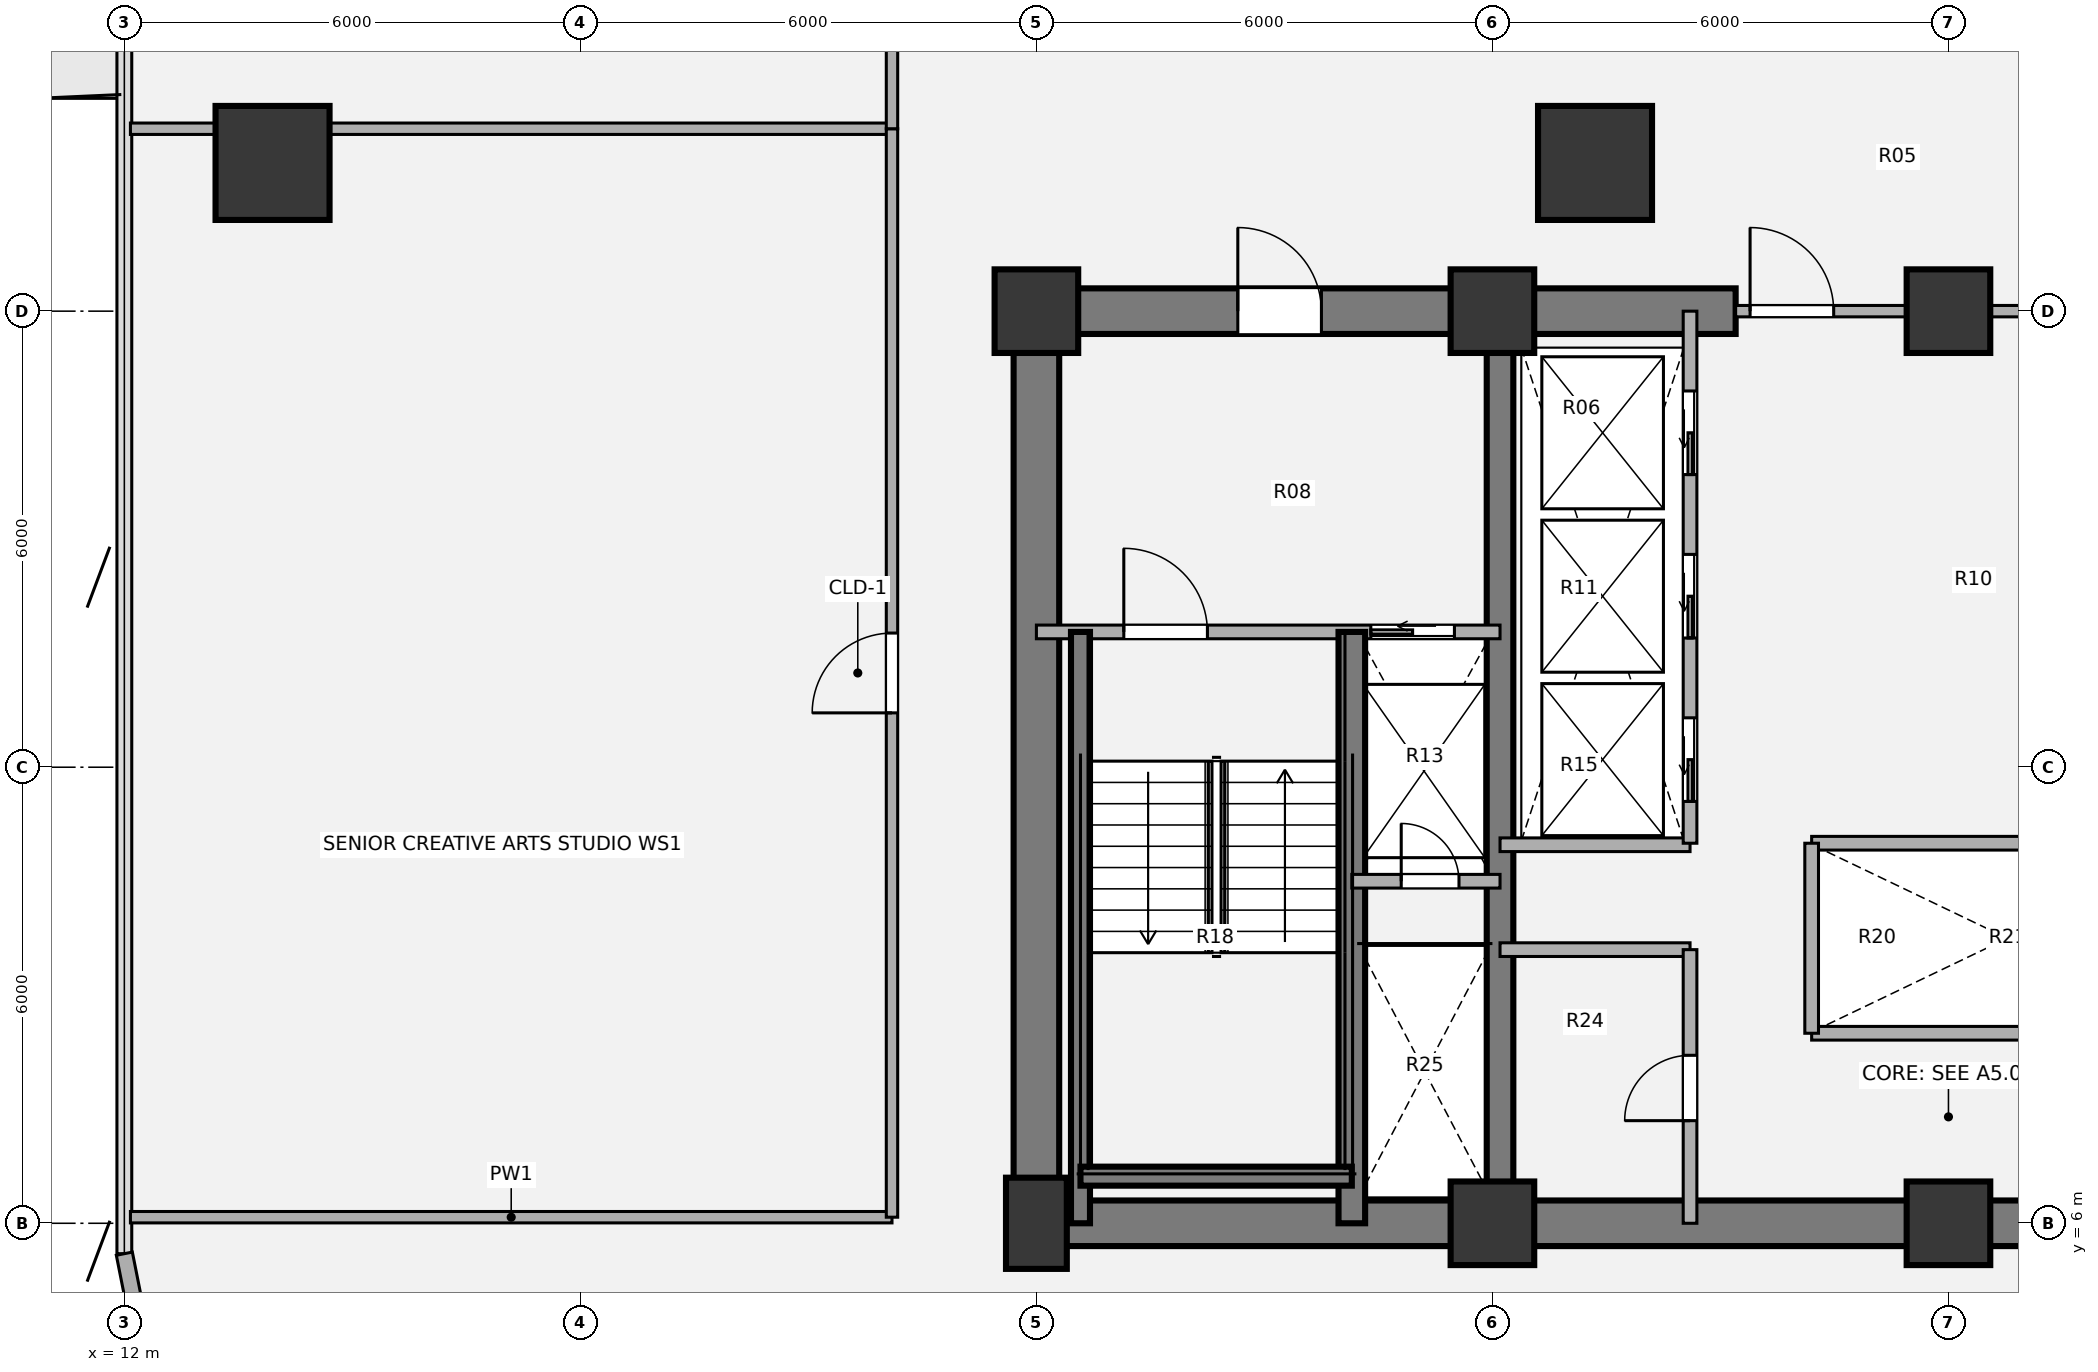
"""IFC4 building model, lengths in metres.
Left out: names, types, materials, properties, quantities, classifications, styles, units other than length and angle.
Written with IfcOpenShell. Run it as: python <this file> out.ifc"""

import sys

from ifc_helpers import new_model, si_unit, direction, frame, frame_2d, origin, origin_2d, place, context, subcontext, project, spatial, rectangle, hollow_circle, extrude, source, transform, mapped, element, fill, save


model = new_model("IFC4")
c1 = context("Model", 3, precision=1e-05, world=origin(), true_north=direction((0.0, 1.0)))
c2 = subcontext(c1, "Body", "Model", "MODEL_VIEW")
j1 = project(units=[si_unit("LENGTHUNIT", "METRE"), si_unit("PLANEANGLEUNIT", "RADIAN")], contexts=[c1])
p1 = place(None, origin())
s1 = spatial("IfcSite", under=j1, at=p1, CompositionType="ELEMENT")
p2 = place(p1, origin())
s2 = spatial("IfcBuilding", under=s1, at=p2, CompositionType="ELEMENT")
p3 = place(p2, frame((0.0, 0.0, 57.24)))
s3 = spatial("IfcBuildingStorey", under=s2, at=p3, CompositionType="ELEMENT", Elevation=57.24)
m1 = source(origin(), c2, "Body", "SweptSolid", [
    extrude(rectangle(XDim=0.8, YDim=1.2, at=origin_2d()), origin(), (0.0, 0.0, 1.0), 3.78),
])
p4 = place(p3, frame((24.0, 6.0, 0.0), z_axis=(0.0, 0.0, 1.0), x_axis=(1.0, 0.0, 0.0)))
e1 = element("IfcColumn", 1, at=p4, inside=s3, PredefinedType="COLUMN", context=c2, shape_type="MappedRepresentation", body=[
    mapped(m1, transform((0.0, 0.0, 0.0), x_axis=(1.0, 0.0, 0.0), y_axis=(0.0, 1.0, 0.0), z_axis=(0.0, 0.0, 1.0), scale=1.0)),
])
m2 = source(origin(), c2, "Body", "SweptSolid", [
    extrude(rectangle(XDim=1.1, YDim=1.1, at=origin_2d()), origin(), (0.0, 0.0, 1.0), 3.78),
])
for number, where, z_axis, x_axis in (
    (2, (30.0, 6.0, 0.0), (0.0, 0.0, 1.0), (1.0, 0.0, 0.0)),
    (3, (36.0, 6.0, 0.0), (0.0, 0.0, 1.0), (1.0, 0.0, 0.0)),
    (4, (24.0, 18.0, 0.0), (0.0, 0.0, 1.0), (1.0, 0.0, 0.0)),
    (5, (30.0, 18.0, 0.0), (0.0, 0.0, 1.0), (1.0, 0.0, 0.0)),
    (6, (36.0, 18.0, 0.0), (0.0, 0.0, 1.0), (1.0, 0.0, 0.0)),
):
    element("IfcColumn", number, at=place(p3, frame(where, z_axis=z_axis, x_axis=x_axis)), inside=s3, PredefinedType="COLUMN", context=c2, shape_type="MappedRepresentation", body=[
        mapped(m2, transform((0.0, 0.0, 0.0), x_axis=(1.0, 0.0, 0.0), y_axis=(0.0, 1.0, 0.0), z_axis=(0.0, 0.0, 1.0), scale=1.0)),
    ])
p5 = place(p3, frame((48.3, 6.0, 0.0), z_axis=(0.0, 0.0, 1.0), x_axis=(-1.0, 0.0, 0.0)))
e7 = element("IfcWall", 7, at=p5, inside=s3, PredefinedType="SHEAR", context=c2, shape_type="SweptSolid", body=[
    extrude(rectangle(XDim=24.6, YDim=0.6, at=frame_2d((12.3, 0.0))), origin(), (0.0, 0.0, 1.0), 3.78),
])
p6 = place(p3, frame((24.0, 6.0, 0.0), z_axis=(0.0, 0.0, 1.0), x_axis=(0.0, 1.0, 0.0)))
e8 = element("IfcWall", 8, at=p6, inside=s3, PredefinedType="SHEAR", context=c2, shape_type="SweptSolid", body=[
    extrude(rectangle(XDim=12.0, YDim=0.6, at=frame_2d((6.0, 0.0))), origin(), (0.0, 0.0, 1.0), 3.78),
])
p7 = place(p3, frame((23.7, 18.0, 0.0), z_axis=(0.0, 0.0, 1.0), x_axis=(1.0, 0.0, 0.0)))
e9 = element("IfcWall", 9, at=p7, inside=s3, PredefinedType="SHEAR", context=c2, shape_type="SweptSolid", body=[
    extrude(rectangle(XDim=9.5, YDim=0.6, at=frame_2d((4.75, 0.0))), origin(), (0.0, 0.0, 1.0), 3.78),
])
p8 = place(p7, frame((2.95, 0.0, 0.0)))
e10 = element("IfcOpeningElement", 10, at=p8, cuts=e9, PredefinedType="OPENING", context=c2, shape_type="SweptSolid", body=[
    extrude(rectangle(XDim=1.1, YDim=2.1, at=origin_2d()), frame((0.55, 0.31, 1.05), z_axis=(0.0, -1.0, 0.0), x_axis=(1.0, 0.0, 0.0)), (0.0, 0.0, 1.0), 0.62),
])
p9 = place(p3, frame((30.1, 6.0, 0.0), z_axis=(0.0, 0.0, 1.0), x_axis=(0.0, 1.0, 0.0)))
e11 = element("IfcWall", 11, at=p9, inside=s3, PredefinedType="SHEAR", context=c2, shape_type="SweptSolid", body=[
    extrude(rectangle(XDim=12.0, YDim=0.35, at=frame_2d((6.0, 0.0))), origin(), (0.0, 0.0, 1.0), 3.78),
])
m3 = source(origin(), c2, "Body", "SweptSolid", [
    extrude(hollow_circle(Radius=0.75, WallThickness=0.05, at=origin_2d()), origin(), (0.0, 0.0, 1.0), 3.78),
])
for number, where, z_axis, x_axis in (
    (12, (13.95, 19.95, 0.0), (0.0, 0.0, 1.0), (1.0, 0.0, 0.0)),
    (13, (31.35, 19.95, 0.0), (0.0, 0.0, 1.0), (1.0, 0.0, 0.0)),
):
    element("IfcColumn", number, at=place(p3, frame(where, z_axis=z_axis, x_axis=x_axis)), inside=s3, PredefinedType="COLUMN", context=c2, shape_type="MappedRepresentation", body=[
        mapped(m3, transform((0.0, 0.0, 0.0), x_axis=(1.0, 0.0, 0.0), y_axis=(0.0, 1.0, 0.0), z_axis=(0.0, 0.0, 1.0), scale=1.0)),
    ])
p10 = place(p3, frame((12.244, 4.375, 0.0), z_axis=(0.0, 0.0, 1.0), x_axis=(-0.195138390419, 0.980775717779, 0.0)))
e14 = element("IfcWall", 14, at=p10, inside=s3, PredefinedType="SOLIDWALL", context=c2, shape_type="SweptSolid", body=[
    extrude(rectangle(XDim=1.249, YDim=0.215, at=frame_2d((0.624, 0.0))), origin(), (0.0, 0.0, 1.0), 3.53),
])
for number, where, z_axis, x_axis in (
    (15, (34.2, 11.0, 0.0), (0.0, 0.0, 1.0), (1.0, 0.0, 0.0)),
    (16, (34.2, 8.5, 0.0), (0.0, 0.0, 1.0), (1.0, 0.0, 0.0)),
):
    element("IfcWall", number, at=place(p3, frame(where, z_axis=z_axis, x_axis=x_axis)), inside=s3, PredefinedType="PARTITIONING", context=c2, shape_type="SweptSolid", body=[
        extrude(rectangle(XDim=5.15, YDim=0.18, at=frame_2d((2.575, 0.0))), origin(), (0.0, 0.0, 1.0), 3.5),
    ])
for number, where, z_axis, x_axis in (
    (17, (34.2, 8.5, 0.0), (0.0, 0.0, 1.0), (0.0, 1.0, 0.0)),
    (18, (30.1, 10.98, 0.0), (0.0, 0.0, 1.0), (1.0, 0.0, 0.0)),
    (19, (30.1, 9.6, 0.0), (0.0, 0.0, 1.0), (1.0, 0.0, 0.0)),
):
    element("IfcWall", number, at=place(p3, frame(where, z_axis=z_axis, x_axis=x_axis)), inside=s3, PredefinedType="PARTITIONING", context=c2, shape_type="SweptSolid", body=[
        extrude(rectangle(XDim=2.5, YDim=0.18, at=frame_2d((1.25, 0.0))), origin(), (0.0, 0.0, 1.0), 3.5),
    ])
p11 = place(p3, frame((32.6, 6.0, 0.0), z_axis=(0.0, 0.0, 1.0), x_axis=(0.0, 1.0, 0.0)))
e20 = element("IfcWall", 20, at=p11, inside=s3, PredefinedType="PARTITIONING", context=c2, shape_type="SweptSolid", body=[
    extrude(rectangle(XDim=3.6, YDim=0.18, at=frame_2d((1.8, 0.0))), origin(), (0.0, 0.0, 1.0), 3.5),
])
p12 = place(p11, frame((1.35, 0.0, 0.0)))
e21 = element("IfcOpeningElement", 21, at=p12, cuts=e20, PredefinedType="OPENING", context=c2, shape_type="SweptSolid", body=[
    extrude(rectangle(XDim=0.86, YDim=2.1, at=origin_2d()), frame((0.43, 0.1, 1.05), z_axis=(0.0, -1.0, 0.0), x_axis=(1.0, 0.0, 0.0)), (0.0, 0.0, 1.0), 0.2),
])
p13 = place(p3, frame((33.2, 18.0, 0.0), z_axis=(0.0, 0.0, 1.0), x_axis=(1.0, 0.0, 0.0)))
e22 = element("IfcWall", 22, at=p13, inside=s3, PredefinedType="PARTITIONING", context=c2, shape_type="SweptSolid", body=[
    extrude(rectangle(XDim=5.6, YDim=0.15, at=frame_2d((2.8, 0.0))), origin(), (0.0, 0.0, 1.0), 2.315),
])
p14 = place(p13, frame((0.19, 0.0, 0.0)))
e23 = element("IfcOpeningElement", 23, at=p14, cuts=e22, PredefinedType="OPENING", context=c2, shape_type="SweptSolid", body=[
    extrude(rectangle(XDim=1.1, YDim=2.1, at=origin_2d()), frame((0.55, 0.085, 1.05), z_axis=(0.0, -1.0, 0.0), x_axis=(1.0, 0.0, 0.0)), (0.0, 0.0, 1.0), 0.17),
])
p15 = place(p13, frame((4.31, 0.0, 0.0)))
e24 = element("IfcOpeningElement", 24, at=p15, cuts=e22, PredefinedType="OPENING", context=c2, shape_type="SweptSolid", body=[
    extrude(rectangle(XDim=1.1, YDim=2.1, at=origin_2d()), frame((0.55, 0.085, 1.05), z_axis=(0.0, -1.0, 0.0), x_axis=(1.0, 0.0, 0.0)), (0.0, 0.0, 1.0), 0.17),
])
p16 = place(p3, frame((24.0, 13.78, 0.0), z_axis=(0.0, 0.0, 1.0), x_axis=(1.0, 0.0, 0.0)))
e25 = element("IfcWall", 25, at=p16, inside=s3, PredefinedType="PARTITIONING", context=c2, shape_type="SweptSolid", body=[
    extrude(rectangle(XDim=6.1, YDim=0.18, at=frame_2d((3.05, 0.0))), origin(), (0.0, 0.0, 1.0), 3.5),
])
p17 = place(p16, frame((1.15, 0.0, 0.0)))
e26 = element("IfcOpeningElement", 26, at=p17, cuts=e25, PredefinedType="OPENING", context=c2, shape_type="SweptSolid", body=[
    extrude(rectangle(XDim=1.1, YDim=2.1, at=origin_2d()), frame((0.55, 0.1, 1.05), z_axis=(0.0, -1.0, 0.0), x_axis=(1.0, 0.0, 0.0)), (0.0, 0.0, 1.0), 0.2),
])
p18 = place(p16, frame((4.4, 0.0, 0.0)))
e27 = element("IfcOpeningElement", 27, at=p18, cuts=e25, PredefinedType="OPENING", context=c2, shape_type="SweptSolid", body=[
    extrude(rectangle(XDim=1.1, YDim=2.1, at=origin_2d()), frame((0.55, 0.1, 1.05), z_axis=(0.0, -1.0, 0.0), x_axis=(1.0, 0.0, 0.0)), (0.0, 0.0, 1.0), 0.2),
])
p19 = place(p3, frame((28.15, 6.0, 0.0), z_axis=(0.0, 0.0, 1.0), x_axis=(0.0, 1.0, 0.0)))
e28 = element("IfcWall", 28, at=p19, inside=s3, PredefinedType="SHEAR", context=c2, shape_type="SweptSolid", body=[
    extrude(rectangle(XDim=7.78, YDim=0.35, at=frame_2d((3.89, 0.0))), origin(), (0.0, 0.0, 1.0), 3.85),
])
p20 = place(p3, frame((24.58, 6.0, 0.0), z_axis=(0.0, 0.0, 1.0), x_axis=(0.0, 1.0, 0.0)))
e29 = element("IfcWall", 29, at=p20, inside=s3, PredefinedType="SHEAR", context=c2, shape_type="SweptSolid", body=[
    extrude(rectangle(XDim=7.78, YDim=0.25, at=frame_2d((3.89, 0.0))), origin(), (0.0, 0.0, 1.0), 3.85),
])
p21 = place(p3, frame((24.58, 6.62, 0.0), z_axis=(0.0, 0.0, 1.0), x_axis=(1.0, 0.0, 0.0)))
e30 = element("IfcWall", 30, at=p21, inside=s3, PredefinedType="SHEAR", context=c2, shape_type="SweptSolid", body=[
    extrude(rectangle(XDim=3.57, YDim=0.25, at=frame_2d((1.785, 0.0))), origin(), (0.0, 0.0, 1.0), 3.85),
])
p22 = place(p3, frame((28.15, 10.5, 0.0), z_axis=(0.0, 0.0, 1.0), x_axis=(1.0, 0.0, 0.0)))
e31 = element("IfcWall", 31, at=p22, inside=s3, PredefinedType="PARTITIONING", context=c2, shape_type="SweptSolid", body=[
    extrude(rectangle(XDim=1.95, YDim=0.18, at=frame_2d((0.975, 0.0))), origin(), (0.0, 0.0, 1.0), 3.5),
])
p23 = place(p22, frame((0.65, 0.0, 0.0)))
e32 = element("IfcOpeningElement", 32, at=p23, cuts=e31, PredefinedType="OPENING", context=c2, shape_type="SweptSolid", body=[
    extrude(rectangle(XDim=0.76, YDim=2.05, at=origin_2d()), frame((0.38, 0.1, 1.025), z_axis=(0.0, -1.0, 0.0), x_axis=(1.0, 0.0, 0.0)), (0.0, 0.0, 1.0), 0.2),
])
p24 = place(p3, frame((32.6, 11.0, 0.0), z_axis=(0.0, 0.0, 1.0), x_axis=(0.0, 1.0, 0.0)))
e33 = element("IfcWall", 33, at=p24, inside=s3, PredefinedType="PARTITIONING", context=c2, shape_type="SweptSolid", body=[
    extrude(rectangle(XDim=7.0, YDim=0.18, at=frame_2d((3.5, 0.0))), origin(), (0.0, 0.0, 1.0), 3.5),
])
p25 = place(p24, frame((0.55, 0.0, 0.0)))
e34 = element("IfcOpeningElement", 34, at=p25, cuts=e33, PredefinedType="OPENING", context=c2, shape_type="SweptSolid", body=[
    extrude(rectangle(XDim=1.1, YDim=2.1, at=origin_2d()), frame((0.55, 0.1, 1.05), z_axis=(0.0, -1.0, 0.0), x_axis=(1.0, 0.0, 0.0)), (0.0, 0.0, 1.0), 0.2),
])
p26 = place(p24, frame((2.7, 0.0, 0.0)))
e35 = element("IfcOpeningElement", 35, at=p26, cuts=e33, PredefinedType="OPENING", context=c2, shape_type="SweptSolid", body=[
    extrude(rectangle(XDim=1.1, YDim=2.1, at=origin_2d()), frame((0.55, 0.1, 1.05), z_axis=(0.0, -1.0, 0.0), x_axis=(1.0, 0.0, 0.0)), (0.0, 0.0, 1.0), 0.2),
])
p27 = place(p24, frame((4.85, 0.0, 0.0)))
e36 = element("IfcOpeningElement", 36, at=p27, cuts=e33, PredefinedType="OPENING", context=c2, shape_type="SweptSolid", body=[
    extrude(rectangle(XDim=1.1, YDim=2.1, at=origin_2d()), frame((0.55, 0.1, 1.05), z_axis=(0.0, -1.0, 0.0), x_axis=(1.0, 0.0, 0.0)), (0.0, 0.0, 1.0), 0.2),
])
p28 = place(p3, frame((12.08, 6.08, 0.0), z_axis=(0.0, 0.0, 1.0), x_axis=(1.0, 0.0, 0.0)))
e37 = element("IfcWall", 37, at=p28, inside=s3, PredefinedType="PARTITIONING", context=c2, shape_type="SweptSolid", body=[
    extrude(rectangle(XDim=10.02, YDim=0.15, at=frame_2d((5.01, 0.0))), origin(), (0.0, 0.0, 1.0), 3.5),
])
p29 = place(p3, frame((12.08, 20.4, 0.0), z_axis=(0.0, 0.0, 1.0), x_axis=(1.0, 0.0, 0.0)))
e38 = element("IfcWall", 38, at=p29, inside=s3, PredefinedType="PARTITIONING", context=c2, shape_type="SweptSolid", body=[
    extrude(rectangle(XDim=10.02, YDim=0.15, at=frame_2d((5.01, 0.0))), origin(), (0.0, 0.0, 1.0), 2.982),
])
p30 = place(p3, frame((22.1, 6.08, 0.0), z_axis=(0.0, 0.0, 1.0), x_axis=(0.0, 1.0, 0.0)))
e39 = element("IfcWall", 39, at=p30, inside=s3, PredefinedType="PARTITIONING", context=c2, shape_type="SweptSolid", body=[
    extrude(rectangle(XDim=14.32, YDim=0.15, at=frame_2d((7.16, 0.0))), origin(), (0.0, 0.0, 1.0), 3.5),
])
p31 = place(p30, frame((6.635, 0.0, 0.0)))
e40 = element("IfcOpeningElement", 40, at=p31, cuts=e39, PredefinedType="OPENING", context=c2, shape_type="SweptSolid", body=[
    extrude(rectangle(XDim=1.05, YDim=2.1, at=origin_2d()), frame((0.525, 0.085, 1.05), z_axis=(0.0, -1.0, 0.0), x_axis=(1.0, 0.0, 0.0)), (0.0, 0.0, 1.0), 0.17),
])
p32 = place(p3, frame((22.1, 20.4, 0.0), z_axis=(0.0, 0.0, 1.0), x_axis=(0.0, 1.0, 0.0)))
e41 = element("IfcWall", 41, at=p32, inside=s3, PredefinedType="PARTITIONING", context=c2, shape_type="SweptSolid", body=[
    extrude(rectangle(XDim=15.521, YDim=0.15, at=frame_2d((7.76, 0.0))), origin(), (0.0, 0.0, 1.0), 3.5),
])
p33 = place(p32, frame((6.975, 0.0, 0.0)))
e42 = element("IfcOpeningElement", 42, at=p33, cuts=e41, PredefinedType="OPENING", context=c2, shape_type="SweptSolid", body=[
    extrude(rectangle(XDim=1.05, YDim=2.1, at=origin_2d()), frame((0.525, 0.085, 1.05), z_axis=(0.0, -1.0, 0.0), x_axis=(1.0, 0.0, 0.0)), (0.0, 0.0, 1.0), 0.17),
])
m4 = source(origin(), c2, "Body", "SweptSolid", [
    extrude(rectangle(XDim=0.86, YDim=2.1, at=origin_2d()), frame((0.43, 0.025, 1.05), z_axis=(0.0, -1.0, 0.0), x_axis=(1.0, 0.0, 0.0)), (0.0, 0.0, 1.0), 0.05),
])
p34 = place(p12, origin())
e43 = element("IfcDoor", 43, at=p34, inside=s3, OperationType="SINGLE_SWING_LEFT", PredefinedType="DOOR", context=c2, shape_type="MappedRepresentation", body=[
    mapped(m4, transform((0.0, 0.0, 0.0), x_axis=(1.0, 0.0, 0.0), y_axis=(0.0, 1.0, 0.0), z_axis=(0.0, 0.0, 1.0), scale=1.0)),
])
fill(e21, e43)
m5 = source(origin(), c2, "Body", "SweptSolid", [
    extrude(rectangle(XDim=1.1, YDim=2.1, at=origin_2d()), frame((0.55, 0.025, 1.05), z_axis=(0.0, -1.0, 0.0), x_axis=(1.0, 0.0, 0.0)), (0.0, 0.0, 1.0), 0.05),
])
p35 = place(p14, origin())
e44 = element("IfcDoor", 44, at=p35, inside=s3, OperationType="SINGLE_SWING_LEFT", PredefinedType="DOOR", context=c2, shape_type="MappedRepresentation", body=[
    mapped(m5, transform((0.0, 0.0, 0.0), x_axis=(1.0, 0.0, 0.0), y_axis=(0.0, 1.0, 0.0), z_axis=(0.0, 0.0, 1.0), scale=1.0)),
])
fill(e23, e44)
m6 = source(origin(), c2, "Body", "SweptSolid", [
    extrude(rectangle(XDim=1.1, YDim=2.1, at=origin_2d()), frame((0.55, 0.025, 1.05), z_axis=(0.0, -1.0, 0.0), x_axis=(1.0, 0.0, 0.0)), (0.0, 0.0, 1.0), 0.05),
])
p36 = place(p17, origin())
e45 = element("IfcDoor", 45, at=p36, inside=s3, OperationType="SINGLE_SWING_LEFT", PredefinedType="DOOR", context=c2, shape_type="MappedRepresentation", body=[
    mapped(m6, transform((0.0, 0.0, 0.0), x_axis=(1.0, 0.0, 0.0), y_axis=(0.0, 1.0, 0.0), z_axis=(0.0, 0.0, 1.0), scale=1.0)),
])
fill(e26, e45)
m7 = source(origin(), c2, "Body", "SweptSolid", [
    extrude(rectangle(XDim=1.1, YDim=2.1, at=origin_2d()), frame((0.55, 0.025, 1.05), z_axis=(0.0, -1.0, 0.0), x_axis=(1.0, 0.0, 0.0)), (0.0, 0.0, 1.0), 0.05),
])
p37 = place(p18, origin())
e46 = element("IfcDoor", 46, at=p37, inside=s3, OperationType="SLIDING_TO_LEFT", PredefinedType="DOOR", context=c2, shape_type="MappedRepresentation", body=[
    mapped(m7, transform((0.0, 0.0, 0.0), x_axis=(1.0, 0.0, 0.0), y_axis=(0.0, 1.0, 0.0), z_axis=(0.0, 0.0, 1.0), scale=1.0)),
])
fill(e27, e46)
m8 = source(origin(), c2, "Body", "SweptSolid", [
    extrude(rectangle(XDim=0.76, YDim=2.05, at=origin_2d()), frame((0.38, 0.025, 1.025), z_axis=(0.0, -1.0, 0.0), x_axis=(1.0, 0.0, 0.0)), (0.0, 0.0, 1.0), 0.05),
])
p38 = place(p23, origin())
e47 = element("IfcDoor", 47, at=p38, inside=s3, OperationType="SINGLE_SWING_LEFT", PredefinedType="DOOR", context=c2, shape_type="MappedRepresentation", body=[
    mapped(m8, transform((0.0, 0.0, 0.0), x_axis=(1.0, 0.0, 0.0), y_axis=(0.0, 1.0, 0.0), z_axis=(0.0, 0.0, 1.0), scale=1.0)),
])
fill(e32, e47)
p39 = place(p8, origin())
e48 = element("IfcDoor", 48, at=p39, inside=s3, OperationType="SINGLE_SWING_LEFT", PredefinedType="DOOR", context=c2, shape_type="MappedRepresentation", body=[
    mapped(m5, transform((0.0, 0.0, 0.0), x_axis=(1.0, 0.0, 0.0), y_axis=(0.0, 1.0, 0.0), z_axis=(0.0, 0.0, 1.0), scale=1.0)),
])
fill(e10, e48)
p40 = place(p25, origin())
e49 = element("IfcDoor", 49, at=p40, inside=s3, OperationType="SLIDING_TO_LEFT", PredefinedType="DOOR", context=c2, shape_type="MappedRepresentation", body=[
    mapped(m7, transform((0.0, 0.0, 0.0), x_axis=(1.0, 0.0, 0.0), y_axis=(0.0, 1.0, 0.0), z_axis=(0.0, 0.0, 1.0), scale=1.0)),
])
fill(e34, e49)
p41 = place(p26, origin())
e50 = element("IfcDoor", 50, at=p41, inside=s3, OperationType="SLIDING_TO_LEFT", PredefinedType="DOOR", context=c2, shape_type="MappedRepresentation", body=[
    mapped(m7, transform((0.0, 0.0, 0.0), x_axis=(1.0, 0.0, 0.0), y_axis=(0.0, 1.0, 0.0), z_axis=(0.0, 0.0, 1.0), scale=1.0)),
])
fill(e35, e50)
p42 = place(p27, origin())
e51 = element("IfcDoor", 51, at=p42, inside=s3, OperationType="SLIDING_TO_LEFT", PredefinedType="DOOR", context=c2, shape_type="MappedRepresentation", body=[
    mapped(m7, transform((0.0, 0.0, 0.0), x_axis=(1.0, 0.0, 0.0), y_axis=(0.0, 1.0, 0.0), z_axis=(0.0, 0.0, 1.0), scale=1.0)),
])
fill(e36, e51)
m9 = source(origin(), c2, "Body", "SweptSolid", [
    extrude(rectangle(XDim=1.05, YDim=2.1, at=origin_2d()), frame((0.525, 0.025, 1.05), z_axis=(0.0, -1.0, 0.0), x_axis=(1.0, 0.0, 0.0)), (0.0, 0.0, 1.0), 0.05),
])
p43 = place(p31, origin())
e52 = element("IfcDoor", 52, at=p43, inside=s3, OperationType="SINGLE_SWING_LEFT", PredefinedType="DOOR", context=c2, shape_type="MappedRepresentation", body=[
    mapped(m9, transform((0.0, 0.0, 0.0), x_axis=(1.0, 0.0, 0.0), y_axis=(0.0, 1.0, 0.0), z_axis=(0.0, 0.0, 1.0), scale=1.0)),
])
fill(e40, e52)
save(model, sys.argv[1])
